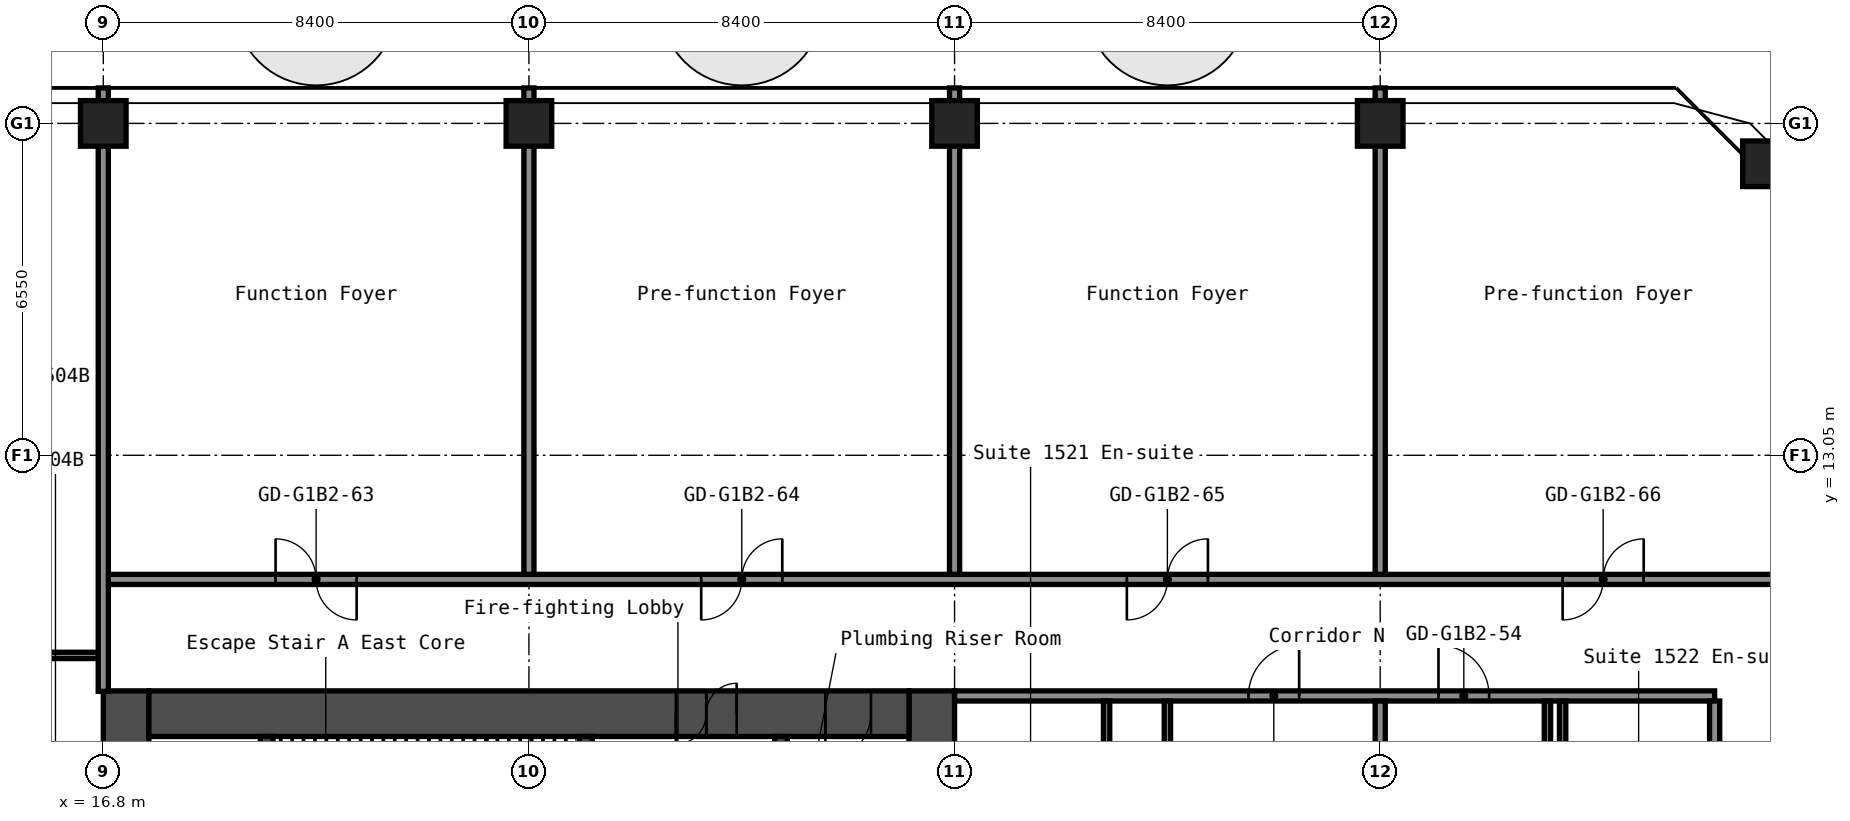
"""IFC4 building model, lengths in metres.
Left out: names, types, materials, properties, quantities, classifications, styles, units other than length and angle.
Written with IfcOpenShell. Run it as: python <this file> out.ifc"""

import sys

from ifc_helpers import new_model, si_unit, direction, frame, frame_2d, origin, origin_2d, place, context, subcontext, project, spatial, rectangle, hollow_rectangle, extrude, element, fill, save


model = new_model("IFC4")
c1 = context("Model", 3, precision=1e-05, world=origin(), true_north=direction((0.0, 1.0)))
c2 = subcontext(c1, "Body", "Model", "MODEL_VIEW")
j1 = project(units=[si_unit("LENGTHUNIT", "METRE"), si_unit("PLANEANGLEUNIT", "RADIAN")], contexts=[c1])
p1 = place(None, origin())
s1 = spatial("IfcSite", under=j1, at=p1, CompositionType="ELEMENT")
p2 = place(p1, origin())
s2 = spatial("IfcBuilding", under=s1, at=p2, CompositionType="ELEMENT")
p3 = place(p2, frame((0.0, 0.0, 55.0)))
s3 = spatial("IfcBuildingStorey", under=s2, at=p3, CompositionType="ELEMENT", Elevation=55.0)
for number, where, z_axis, x_axis in (
    (1, (16.8, 19.6, 0.0), (0.0, 0.0, 1.0), (1.0, 0.0, 0.0)),
    (2, (25.2, 19.6, 0.0), (0.0, 0.0, 1.0), (1.0, 0.0, 0.0)),
    (3, (33.6, 19.6, 0.0), (0.0, 0.0, 1.0), (1.0, 0.0, 0.0)),
    (4, (42.0, 19.6, 0.0), (0.0, 0.0, 1.0), (1.0, 0.0, 0.0)),
    (5, (49.603, 18.803, 0.0), (0.0, 0.0, 1.0), (1.0, 0.0, 0.0)),
):
    element("IfcColumn", number, at=place(p3, frame(where, z_axis=z_axis, x_axis=x_axis)), inside=s3, PredefinedType="COLUMN", context=c2, shape_type="SweptSolid", body=[
        extrude(hollow_rectangle(XDim=0.9, YDim=0.9, WallThickness=0.036, at=origin_2d()), origin(), (0.0, 0.0, 1.0), 2.8),
    ])
p4 = place(p3, frame((17.25, -8.4, 0.0), z_axis=(0.0, 0.0, 1.0), x_axis=(0.0, 1.0, 0.0)))
e6 = element("IfcWall", 6, at=p4, inside=s3, PredefinedType="SHEAR", context=c2, shape_type="SweptSolid", body=[
    extrude(rectangle(XDim=16.8, YDim=0.9, at=frame_2d((8.4, 0.0))), origin(), (0.0, 0.0, 1.0), 2.8),
])
p5 = place(p4, frame((12.75, 0.0, 0.0)))
e7 = element("IfcOpeningElement", 7, at=p5, cuts=e6, PredefinedType="OPENING", context=c2, shape_type="SweptSolid", body=[
    extrude(rectangle(XDim=1.2, YDim=2.1, at=frame_2d((0.6, 1.05))), frame((0.0, 0.46, 0.0), z_axis=(0.0, -1.0, 0.0), x_axis=(1.0, 0.0, 0.0)), (0.0, 0.0, 1.0), 0.92),
])
p6 = place(p4, frame((2.85, 0.0, 0.0)))
e8 = element("IfcOpeningElement", 8, at=p6, cuts=e6, PredefinedType="OPENING", context=c2, shape_type="SweptSolid", body=[
    extrude(rectangle(XDim=1.2, YDim=2.1, at=frame_2d((0.6, 1.05))), frame((0.0, 0.46, 0.0), z_axis=(0.0, -1.0, 0.0), x_axis=(1.0, 0.0, 0.0)), (0.0, 0.0, 1.0), 0.92),
])
p7 = place(p3, frame((33.15, -8.4, 0.0), z_axis=(0.0, 0.0, 1.0), x_axis=(0.0, 1.0, 0.0)))
e9 = element("IfcWall", 9, at=p7, inside=s3, PredefinedType="SHEAR", context=c2, shape_type="SweptSolid", body=[
    extrude(rectangle(XDim=16.8, YDim=0.9, at=frame_2d((8.4, 0.0))), origin(), (0.0, 0.0, 1.0), 2.8),
])
p8 = place(p3, frame((17.7, 7.95, 0.0), z_axis=(0.0, 0.0, 1.0), x_axis=(1.0, 0.0, 0.0)))
e10 = element("IfcWall", 10, at=p8, inside=s3, PredefinedType="SHEAR", context=c2, shape_type="SweptSolid", body=[
    extrude(rectangle(XDim=15.0, YDim=0.9, at=frame_2d((7.5, 0.0))), origin(), (0.0, 0.0, 1.0), 2.8),
])
p9 = place(p8, frame((10.4, 0.0, 0.0)))
e11 = element("IfcOpeningElement", 11, at=p9, cuts=e10, PredefinedType="OPENING", context=c2, shape_type="SweptSolid", body=[
    extrude(rectangle(XDim=1.2, YDim=2.1, at=frame_2d((0.6, 1.05))), frame((0.0, 0.46, 0.0), z_axis=(0.0, -1.0, 0.0), x_axis=(1.0, 0.0, 0.0)), (0.0, 0.0, 1.0), 0.92),
])
p10 = place(p8, frame((13.35, 0.0, 0.0)))
e12 = element("IfcOpeningElement", 12, at=p10, cuts=e10, PredefinedType="OPENING", context=c2, shape_type="SweptSolid", body=[
    extrude(rectangle(XDim=0.9, YDim=2.1, at=frame_2d((0.45, 1.05))), frame((0.0, 0.46, 0.0), z_axis=(0.0, -1.0, 0.0), x_axis=(1.0, 0.0, 0.0)), (0.0, 0.0, 1.0), 0.92),
])
p11 = place(p3, frame((20.025, 1.2, 0.0), z_axis=(0.0, 0.0, 1.0), x_axis=(0.0, 1.0, 0.0)))
e13 = element("IfcWall", 13, at=p11, inside=s3, PredefinedType="SHEAR", context=c2, shape_type="SweptSolid", body=[
    extrude(rectangle(XDim=6.3, YDim=0.25, at=frame_2d((3.15, 0.0))), origin(), (0.0, 0.0, 1.0), 2.8),
])
p12 = place(p3, frame((26.325, 3.75, 0.0), z_axis=(0.0, 0.0, 1.0), x_axis=(0.0, 1.0, 0.0)))
e14 = element("IfcWall", 14, at=p12, inside=s3, PredefinedType="SHEAR", context=c2, shape_type="SweptSolid", body=[
    extrude(rectangle(XDim=3.75, YDim=0.25, at=frame_2d((1.875, 0.0))), origin(), (0.0, 0.0, 1.0), 2.8),
])
p13 = place(p12, frame((1.25, 0.0, 0.0)))
e15 = element("IfcOpeningElement", 15, at=p13, cuts=e14, PredefinedType="OPENING", context=c2, shape_type="SweptSolid", body=[
    extrude(rectangle(XDim=1.2, YDim=2.1, at=frame_2d((0.6, 1.05))), frame((0.0, 0.135, 0.0), z_axis=(0.0, -1.0, 0.0), x_axis=(1.0, 0.0, 0.0)), (0.0, 0.0, 1.0), 0.27),
])
p14 = place(p3, frame((30.175, 1.45, 0.0), z_axis=(0.0, 0.0, 1.0), x_axis=(0.0, 1.0, 0.0)))
e16 = element("IfcWall", 16, at=p14, inside=s3, PredefinedType="SHEAR", context=c2, shape_type="SweptSolid", body=[
    extrude(rectangle(XDim=6.05, YDim=0.25, at=frame_2d((3.025, 0.0))), origin(), (0.0, 0.0, 1.0), 2.8),
])
p15 = place(p14, frame((2.625, 0.0, 0.0)))
e17 = element("IfcOpeningElement", 17, at=p15, cuts=e16, PredefinedType="OPENING", context=c2, shape_type="SweptSolid", body=[
    extrude(rectangle(XDim=1.1, YDim=2.1, at=frame_2d((0.55, 1.05))), frame((0.0, 0.135, 0.0), z_axis=(0.0, -1.0, 0.0), x_axis=(1.0, 0.0, 0.0)), (0.0, 0.0, 1.0), 0.27),
])
p16 = place(p3, frame((33.6, 8.3, 0.0), z_axis=(0.0, 0.0, 1.0), x_axis=(1.0, 0.0, 0.0)))
e18 = element("IfcWall", 18, at=p16, inside=s3, PredefinedType="PARTITIONING", context=c2, shape_type="SweptSolid", body=[
    extrude(rectangle(XDim=15.0, YDim=0.2, at=frame_2d((7.5, 0.0))), origin(), (0.0, 0.0, 1.0), 2.8),
])
p17 = place(p16, frame((5.8, 0.0, 0.0)))
e19 = element("IfcOpeningElement", 19, at=p17, cuts=e18, PredefinedType="OPENING", context=c2, shape_type="SweptSolid", body=[
    extrude(rectangle(XDim=1.0, YDim=2.1, at=frame_2d((0.5, 1.05))), frame((0.0, 0.11, 0.0), z_axis=(0.0, -1.0, 0.0), x_axis=(1.0, 0.0, 0.0)), (0.0, 0.0, 1.0), 0.22),
])
p18 = place(p16, frame((9.55, 0.0, 0.0)))
e20 = element("IfcOpeningElement", 20, at=p18, cuts=e18, PredefinedType="OPENING", context=c2, shape_type="SweptSolid", body=[
    extrude(rectangle(XDim=1.0, YDim=2.1, at=frame_2d((0.5, 1.05))), frame((0.0, 0.11, 0.0), z_axis=(0.0, -1.0, 0.0), x_axis=(1.0, 0.0, 0.0)), (0.0, 0.0, 1.0), 0.22),
])
p19 = place(p3, frame((14.363, 9.1, 0.0), z_axis=(0.0, 0.0, 1.0), x_axis=(1.0, 0.0, 0.0)))
e21 = element("IfcWall", 21, at=p19, inside=s3, PredefinedType="PARTITIONING", context=c2, shape_type="SweptSolid", body=[
    extrude(rectangle(XDim=2.337, YDim=0.125, at=frame_2d((1.169, 0.0))), origin(), (0.0, 0.0, 1.0), 2.8),
])
p20 = place(p3, frame((16.8, 10.6, 0.0), z_axis=(0.0, 0.0, 1.0), x_axis=(1.0, 0.0, 0.0)))
e22 = element("IfcWall", 22, at=p20, inside=s3, PredefinedType="PARTITIONING", context=c2, shape_type="SweptSolid", body=[
    extrude(rectangle(XDim=34.3, YDim=0.2, at=frame_2d((17.15, 0.0))), origin(), (0.0, 0.0, 1.0), 2.8),
])
p21 = place(p20, frame((3.4, 0.0, 0.0)))
e23 = element("IfcOpeningElement", 23, at=p21, cuts=e22, PredefinedType="OPENING", context=c2, shape_type="SweptSolid", body=[
    extrude(rectangle(XDim=1.6, YDim=2.1, at=frame_2d((0.8, 1.05))), frame((0.0, 0.11, 0.0), z_axis=(0.0, -1.0, 0.0), x_axis=(1.0, 0.0, 0.0)), (0.0, 0.0, 1.0), 0.22),
])
p22 = place(p20, frame((11.8, 0.0, 0.0)))
e24 = element("IfcOpeningElement", 24, at=p22, cuts=e22, PredefinedType="OPENING", context=c2, shape_type="SweptSolid", body=[
    extrude(rectangle(XDim=1.6, YDim=2.1, at=frame_2d((0.8, 1.05))), frame((0.0, 0.11, 0.0), z_axis=(0.0, -1.0, 0.0), x_axis=(1.0, 0.0, 0.0)), (0.0, 0.0, 1.0), 0.22),
])
p23 = place(p20, frame((20.2, 0.0, 0.0)))
e25 = element("IfcOpeningElement", 25, at=p23, cuts=e22, PredefinedType="OPENING", context=c2, shape_type="SweptSolid", body=[
    extrude(rectangle(XDim=1.6, YDim=2.1, at=frame_2d((0.8, 1.05))), frame((0.0, 0.11, 0.0), z_axis=(0.0, -1.0, 0.0), x_axis=(1.0, 0.0, 0.0)), (0.0, 0.0, 1.0), 0.22),
])
p24 = place(p20, frame((28.8, 0.0, 0.0)))
e26 = element("IfcOpeningElement", 26, at=p24, cuts=e22, PredefinedType="OPENING", context=c2, shape_type="SweptSolid", body=[
    extrude(rectangle(XDim=1.6, YDim=2.1, at=frame_2d((0.8, 1.05))), frame((0.0, 0.11, 0.0), z_axis=(0.0, -1.0, 0.0), x_axis=(1.0, 0.0, 0.0)), (0.0, 0.0, 1.0), 0.22),
])
p25 = place(p3, frame((16.8, 8.39, 0.0), z_axis=(0.0, 0.0, 1.0), x_axis=(0.0, 1.0, 0.0)))
e27 = element("IfcWall", 27, at=p25, inside=s3, PredefinedType="PARTITIONING", context=c2, shape_type="SweptSolid", body=[
    extrude(rectangle(XDim=11.91, YDim=0.2, at=frame_2d((5.955, 0.0))), origin(), (0.0, 0.0, 1.0), 2.8),
])
for number, where, z_axis, x_axis in (
    (28, (25.2, 10.7, 0.0), (0.0, 0.0, 1.0), (0.0, 1.0, 0.0)),
    (29, (33.6, 10.7, 0.0), (0.0, 0.0, 1.0), (0.0, 1.0, 0.0)),
):
    element("IfcWall", number, at=place(p3, frame(where, z_axis=z_axis, x_axis=x_axis)), inside=s3, PredefinedType="PARTITIONING", context=c2, shape_type="SweptSolid", body=[
        extrude(rectangle(XDim=9.6, YDim=0.2, at=frame_2d((4.8, 0.0))), origin(), (0.0, 0.0, 1.0), 2.8),
    ])
p26 = place(p3, frame((36.6, 5.1, 0.0), z_axis=(0.0, 0.0, 1.0), x_axis=(0.0, 1.0, 0.0)))
e30 = element("IfcWall", 30, at=p26, inside=s3, PredefinedType="PARTITIONING", context=c2, shape_type="SweptSolid", body=[
    extrude(rectangle(XDim=3.1, YDim=0.125, at=frame_2d((1.55, 0.0))), origin(), (0.0, 0.0, 1.0), 2.8),
])
p27 = place(p3, frame((37.8, 0.1, 0.0), z_axis=(0.0, 0.0, 1.0), x_axis=(0.0, 1.0, 0.0)))
e31 = element("IfcWall", 31, at=p27, inside=s3, PredefinedType="PARTITIONING", context=c2, shape_type="SweptSolid", body=[
    extrude(rectangle(XDim=8.1, YDim=0.125, at=frame_2d((4.05, 0.0))), origin(), (0.0, 0.0, 1.0), 2.8),
])
p28 = place(p27, frame((3.15, 0.0, 0.0)))
e32 = element("IfcOpeningElement", 32, at=p28, cuts=e31, PredefinedType="OPENING", context=c2, shape_type="SweptSolid", body=[
    extrude(rectangle(XDim=0.9, YDim=2.1, at=frame_2d((0.45, 1.05))), frame((0.0, 0.073, 0.0), z_axis=(0.0, -1.0, 0.0), x_axis=(1.0, 0.0, 0.0)), (0.0, 0.0, 1.0), 0.145),
])
p29 = place(p3, frame((42.0, -8.2, 0.0), z_axis=(0.0, 0.0, 1.0), x_axis=(0.0, 1.0, 0.0)))
e33 = element("IfcWall", 33, at=p29, inside=s3, PredefinedType="PARTITIONING", context=c2, shape_type="SweptSolid", body=[
    extrude(rectangle(XDim=16.4, YDim=0.2, at=frame_2d((8.2, 0.0))), origin(), (0.0, 0.0, 1.0), 2.8),
])
p30 = place(p3, frame((42.0, 10.7, 0.0), z_axis=(0.0, 0.0, 1.0), x_axis=(0.0, 1.0, 0.0)))
e34 = element("IfcWall", 34, at=p30, inside=s3, PredefinedType="PARTITIONING", context=c2, shape_type="SweptSolid", body=[
    extrude(rectangle(XDim=9.6, YDim=0.2, at=frame_2d((4.8, 0.0))), origin(), (0.0, 0.0, 1.0), 2.8),
])
p31 = place(p3, frame((45.3, 0.1, 0.0), z_axis=(0.0, 0.0, 1.0), x_axis=(0.0, 1.0, 0.0)))
e35 = element("IfcWall", 35, at=p31, inside=s3, PredefinedType="PARTITIONING", context=c2, shape_type="SweptSolid", body=[
    extrude(rectangle(XDim=8.1, YDim=0.125, at=frame_2d((4.05, 0.0))), origin(), (0.0, 0.0, 1.0), 2.8),
])
p32 = place(p31, frame((3.15, 0.0, 0.0)))
e36 = element("IfcOpeningElement", 36, at=p32, cuts=e35, PredefinedType="OPENING", context=c2, shape_type="SweptSolid", body=[
    extrude(rectangle(XDim=0.9, YDim=2.1, at=frame_2d((0.45, 1.05))), frame((0.0, 0.073, 0.0), z_axis=(0.0, -1.0, 0.0), x_axis=(1.0, 0.0, 0.0)), (0.0, 0.0, 1.0), 0.145),
])
p33 = place(p3, frame((45.6, 5.1, 0.0), z_axis=(0.0, 0.0, 1.0), x_axis=(0.0, 1.0, 0.0)))
e37 = element("IfcWall", 37, at=p33, inside=s3, PredefinedType="PARTITIONING", context=c2, shape_type="SweptSolid", body=[
    extrude(rectangle(XDim=3.1, YDim=0.125, at=frame_2d((1.55, 0.0))), origin(), (0.0, 0.0, 1.0), 2.8),
])
p34 = place(p3, frame((48.6, -8.2, 0.0), z_axis=(0.0, 0.0, 1.0), x_axis=(0.0, 1.0, 0.0)))
e38 = element("IfcWall", 38, at=p34, inside=s3, PredefinedType="PARTITIONING", context=c2, shape_type="SweptSolid", body=[
    extrude(rectangle(XDim=16.4, YDim=0.2, at=frame_2d((8.2, 0.0))), origin(), (0.0, 0.0, 1.0), 2.8),
])
p35 = place(p9, origin())
e39 = element("IfcDoor", 39, at=p35, inside=s3, OperationType="DOUBLE_DOOR_SINGLE_SWING", PredefinedType="DOOR", context=c2, shape_type="SweptSolid", body=[
    extrude(rectangle(XDim=1.2, YDim=2.1, at=frame_2d((0.6, 1.05))), frame((0.0, 0.025, 0.0), z_axis=(0.0, -1.0, 0.0), x_axis=(1.0, 0.0, 0.0)), (0.0, 0.0, 1.0), 0.05),
])
fill(e11, e39)
p36 = place(p10, origin())
e40 = element("IfcDoor", 40, at=p36, inside=s3, OperationType="SINGLE_SWING_LEFT", PredefinedType="DOOR", context=c2, shape_type="SweptSolid", body=[
    extrude(rectangle(XDim=0.9, YDim=2.1, at=frame_2d((0.45, 1.05))), frame((0.0, 0.025, 0.0), z_axis=(0.0, -1.0, 0.0), x_axis=(1.0, 0.0, 0.0)), (0.0, 0.0, 1.0), 0.05),
])
fill(e12, e40)
p37 = place(p17, origin())
e41 = element("IfcDoor", 41, at=p37, inside=s3, OperationType="SINGLE_SWING_LEFT", PredefinedType="DOOR", context=c2, shape_type="SweptSolid", body=[
    extrude(rectangle(XDim=1.0, YDim=2.1, at=frame_2d((0.5, 1.05))), frame((0.0, 0.025, 0.0), z_axis=(0.0, -1.0, 0.0), x_axis=(1.0, 0.0, 0.0)), (0.0, 0.0, 1.0), 0.05),
])
fill(e19, e41)
p38 = place(p18, origin())
e42 = element("IfcDoor", 42, at=p38, inside=s3, OperationType="SINGLE_SWING_RIGHT", PredefinedType="DOOR", context=c2, shape_type="SweptSolid", body=[
    extrude(rectangle(XDim=1.0, YDim=2.1, at=frame_2d((0.5, 1.05))), frame((0.0, 0.025, 0.0), z_axis=(0.0, -1.0, 0.0), x_axis=(1.0, 0.0, 0.0)), (0.0, 0.0, 1.0), 0.05),
])
fill(e20, e42)
p39 = place(p21, origin())
e43 = element("IfcDoor", 43, at=p39, inside=s3, OperationType="DOUBLE_DOOR_SINGLE_SWING", PredefinedType="DOOR", context=c2, shape_type="SweptSolid", body=[
    extrude(rectangle(XDim=1.6, YDim=2.1, at=frame_2d((0.8, 1.05))), frame((0.0, 0.025, 0.0), z_axis=(0.0, -1.0, 0.0), x_axis=(1.0, 0.0, 0.0)), (0.0, 0.0, 1.0), 0.05),
])
fill(e23, e43)
p40 = place(p22, origin())
e44 = element("IfcDoor", 44, at=p40, inside=s3, OperationType="DOUBLE_DOOR_SINGLE_SWING", PredefinedType="DOOR", context=c2, shape_type="SweptSolid", body=[
    extrude(rectangle(XDim=1.6, YDim=2.1, at=frame_2d((0.8, 1.05))), frame((0.0, 0.025, 0.0), z_axis=(0.0, -1.0, 0.0), x_axis=(1.0, 0.0, 0.0)), (0.0, 0.0, 1.0), 0.05),
])
fill(e24, e44)
p41 = place(p23, origin())
e45 = element("IfcDoor", 45, at=p41, inside=s3, OperationType="DOUBLE_DOOR_SINGLE_SWING", PredefinedType="DOOR", context=c2, shape_type="SweptSolid", body=[
    extrude(rectangle(XDim=1.6, YDim=2.1, at=frame_2d((0.8, 1.05))), frame((0.0, 0.025, 0.0), z_axis=(0.0, -1.0, 0.0), x_axis=(1.0, 0.0, 0.0)), (0.0, 0.0, 1.0), 0.05),
])
fill(e25, e45)
p42 = place(p24, origin())
e46 = element("IfcDoor", 46, at=p42, inside=s3, OperationType="DOUBLE_DOOR_SINGLE_SWING", PredefinedType="DOOR", context=c2, shape_type="SweptSolid", body=[
    extrude(rectangle(XDim=1.6, YDim=2.1, at=frame_2d((0.8, 1.05))), frame((0.0, 0.025, 0.0), z_axis=(0.0, -1.0, 0.0), x_axis=(1.0, 0.0, 0.0)), (0.0, 0.0, 1.0), 0.05),
])
fill(e26, e46)
save(model, sys.argv[1])
